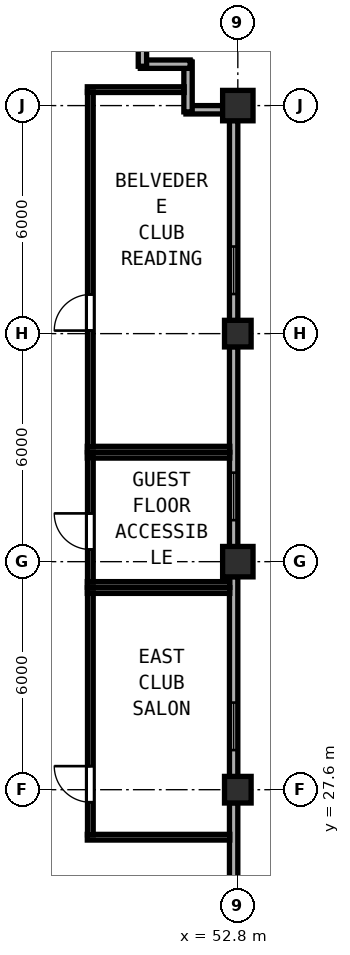
"""IFC4 building model, lengths in metres.
Left out: names, types, materials, properties, quantities, classifications, styles, units other than length and angle.
Written with IfcOpenShell. Run it as: python <this file> out.ifc"""

import sys

from ifc_helpers import new_model, si_unit, direction, frame, frame_2d, origin, origin_2d, place, context, subcontext, project, spatial, rectangle, hollow_rectangle, extrude, element, fill, save


model = new_model("IFC4")
c1 = context("Model", 3, precision=1e-05, world=origin(), true_north=direction((0.0, 1.0)))
c2 = subcontext(c1, "Body", "Model", "MODEL_VIEW")
j1 = project(units=[si_unit("LENGTHUNIT", "METRE"), si_unit("PLANEANGLEUNIT", "RADIAN")], contexts=[c1])
p1 = place(None, origin())
s1 = spatial("IfcSite", under=j1, at=p1, CompositionType="ELEMENT")
p2 = place(p1, origin())
s2 = spatial("IfcBuilding", under=s1, at=p2, CompositionType="ELEMENT")
p3 = place(p2, frame((0.0, 0.0, 269.85)))
s3 = spatial("IfcBuildingStorey", under=s2, at=p3, CompositionType="ELEMENT", Elevation=269.85)
for number, where, z_axis, x_axis in (
    (1, (52.8, 33.6, 0.0), (0.0, 0.0, 1.0), (1.0, 0.0, 0.0)),
    (2, (52.8, 45.6, 0.0), (0.0, 0.0, 1.0), (1.0, 0.0, 0.0)),
):
    element("IfcColumn", number, at=place(p3, frame(where, z_axis=z_axis, x_axis=x_axis)), inside=s3, PredefinedType="COLUMN", context=c2, shape_type="SweptSolid", body=[
        extrude(hollow_rectangle(XDim=0.8, YDim=0.8, WallThickness=0.03, at=origin_2d()), origin(), (0.0, 0.0, 1.0), 3.85),
    ])
for number, where, z_axis, x_axis in (
    (3, (52.8, 27.6, 0.0), (0.0, 0.0, 1.0), (1.0, 0.0, 0.0)),
    (4, (52.8, 39.6, 0.0), (0.0, 0.0, 1.0), (1.0, 0.0, 0.0)),
):
    element("IfcColumn", number, at=place(p3, frame(where, z_axis=z_axis, x_axis=x_axis)), inside=s3, PredefinedType="COLUMN", context=c2, shape_type="SweptSolid", body=[
        extrude(hollow_rectangle(XDim=0.7, YDim=0.7, WallThickness=0.026, at=origin_2d()), origin(), (0.0, 0.0, 1.0), 3.85),
    ])
p4 = place(p3, frame((52.69, 21.992, 0.0), z_axis=(0.0, 0.0, 1.0), x_axis=(0.0, 1.0, 0.0)))
e5 = element("IfcWall", 5, at=p4, inside=s3, PredefinedType="SOLIDWALL", context=c2, shape_type="SweptSolid", body=[
    extrude(rectangle(XDim=5.266, YDim=0.22, at=frame_2d((2.633, 0.0))), origin(), (0.0, 0.0, 1.0), 3.315),
])
p5 = place(p4, frame((0.7, 0.0, 0.85)))
e6 = element("IfcOpeningElement", 6, at=p5, cuts=e5, PredefinedType="OPENING", context=c2, shape_type="SweptSolid", body=[
    extrude(rectangle(XDim=1.25, YDim=1.95, at=frame_2d((0.625, 0.975))), frame((0.0, 0.12, 0.0), z_axis=(0.0, -1.0, 0.0), x_axis=(1.0, 0.0, 0.0)), (0.0, 0.0, 1.0), 0.24),
])
p6 = place(p3, frame((52.69, 27.942, 0.0), z_axis=(0.0, 0.0, 1.0), x_axis=(0.0, 1.0, 0.0)))
e7 = element("IfcWall", 7, at=p6, inside=s3, PredefinedType="SOLIDWALL", context=c2, shape_type="SweptSolid", body=[
    extrude(rectangle(XDim=5.266, YDim=0.22, at=frame_2d((2.633, 0.0))), origin(), (0.0, 0.0, 1.0), 3.315),
])
p7 = place(p6, frame((0.7, 0.0, 0.85)))
e8 = element("IfcOpeningElement", 8, at=p7, cuts=e7, PredefinedType="OPENING", context=c2, shape_type="SweptSolid", body=[
    extrude(rectangle(XDim=1.25, YDim=1.95, at=frame_2d((0.625, 0.975))), frame((0.0, 0.12, 0.0), z_axis=(0.0, -1.0, 0.0), x_axis=(1.0, 0.0, 0.0)), (0.0, 0.0, 1.0), 0.24),
])
p8 = place(p3, frame((52.69, 33.992, 0.0), z_axis=(0.0, 0.0, 1.0), x_axis=(0.0, 1.0, 0.0)))
e9 = element("IfcWall", 9, at=p8, inside=s3, PredefinedType="SOLIDWALL", context=c2, shape_type="SweptSolid", body=[
    extrude(rectangle(XDim=5.266, YDim=0.22, at=frame_2d((2.633, 0.0))), origin(), (0.0, 0.0, 1.0), 3.315),
])
p9 = place(p8, frame((0.7, 0.0, 0.85)))
e10 = element("IfcOpeningElement", 10, at=p9, cuts=e9, PredefinedType="OPENING", context=c2, shape_type="SweptSolid", body=[
    extrude(rectangle(XDim=1.25, YDim=1.95, at=frame_2d((0.625, 0.975))), frame((0.0, 0.12, 0.0), z_axis=(0.0, -1.0, 0.0), x_axis=(1.0, 0.0, 0.0)), (0.0, 0.0, 1.0), 0.24),
])
p10 = place(p3, frame((52.69, 39.942, 0.0), z_axis=(0.0, 0.0, 1.0), x_axis=(0.0, 1.0, 0.0)))
e11 = element("IfcWall", 11, at=p10, inside=s3, PredefinedType="SOLIDWALL", context=c2, shape_type="SweptSolid", body=[
    extrude(rectangle(XDim=5.266, YDim=0.22, at=frame_2d((2.633, 0.0))), origin(), (0.0, 0.0, 1.0), 3.315),
])
p11 = place(p10, frame((0.7, 0.0, 0.85)))
e12 = element("IfcOpeningElement", 12, at=p11, cuts=e11, PredefinedType="OPENING", context=c2, shape_type="SweptSolid", body=[
    extrude(rectangle(XDim=1.25, YDim=1.95, at=frame_2d((0.625, 0.975))), frame((0.0, 0.12, 0.0), z_axis=(0.0, -1.0, 0.0), x_axis=(1.0, 0.0, 0.0)), (0.0, 0.0, 1.0), 0.24),
])
p12 = place(p3, frame((52.408, 45.49, 0.0), z_axis=(0.0, 0.0, 1.0), x_axis=(-1.0, 0.0, 0.0)))
e13 = element("IfcWall", 13, at=p12, inside=s3, PredefinedType="SOLIDWALL", context=c2, shape_type="SweptSolid", body=[
    extrude(rectangle(XDim=0.973, YDim=0.22, at=frame_2d((0.486, 0.0))), origin(), (0.0, 0.0, 1.0), 3.67),
])
p13 = place(p3, frame((51.49, 45.435, 0.0), z_axis=(0.0, 0.0, 1.0), x_axis=(0.0, 1.0, 0.0)))
e14 = element("IfcWall", 14, at=p13, inside=s3, PredefinedType="SOLIDWALL", context=c2, shape_type="SweptSolid", body=[
    extrude(rectangle(XDim=1.31, YDim=0.22, at=frame_2d((0.655, 0.0))), origin(), (0.0, 0.0, 1.0), 3.67),
])
p14 = place(p3, frame((51.545, 46.69, 0.0), z_axis=(0.0, 0.0, 1.0), x_axis=(-1.0, 0.0, 0.0)))
e15 = element("IfcWall", 15, at=p14, inside=s3, PredefinedType="SOLIDWALL", context=c2, shape_type="SweptSolid", body=[
    extrude(rectangle(XDim=1.31, YDim=0.22, at=frame_2d((0.655, 0.0))), origin(), (0.0, 0.0, 1.0), 3.67),
])
p15 = place(p3, frame((50.29, 46.635, 0.0), z_axis=(0.0, 0.0, 1.0), x_axis=(0.0, 1.0, 0.0)))
e16 = element("IfcWall", 16, at=p15, inside=s3, PredefinedType="SOLIDWALL", context=c2, shape_type="SweptSolid", body=[
    extrude(rectangle(XDim=1.535, YDim=0.22, at=frame_2d((0.768, 0.0))), origin(), (0.0, 0.0, 1.0), 3.67),
])
for number, where, z_axis, x_axis in (
    (17, (48.84, 36.4, 0.0), (0.0, 0.0, 1.0), (1.0, 0.0, 0.0)),
    (18, (48.84, 33.0, 0.0), (0.0, 0.0, 1.0), (1.0, 0.0, 0.0)),
):
    element("IfcWall", number, at=place(p3, frame(where, z_axis=z_axis, x_axis=x_axis)), inside=s3, PredefinedType="PARTITIONING", context=c2, shape_type="SweptSolid", body=[
        extrude(rectangle(XDim=3.748, YDim=0.15, at=frame_2d((1.874, 0.0))), origin(), (0.0, 0.0, 1.0), 3.67),
    ])
p16 = place(p3, frame((48.92, 33.06, 0.0), z_axis=(0.0, 0.0, 1.0), x_axis=(0.0, 1.0, 0.0)))
e19 = element("IfcWall", 19, at=p16, inside=s3, PredefinedType="PARTITIONING", context=c2, shape_type="SweptSolid", body=[
    extrude(rectangle(XDim=3.28, YDim=0.15, at=frame_2d((1.64, 0.0))), origin(), (0.0, 0.0, 1.0), 3.67),
])
p17 = place(p16, frame((0.86, 0.0, 0.0)))
e20 = element("IfcOpeningElement", 20, at=p17, cuts=e19, PredefinedType="OPENING", context=c2, shape_type="SweptSolid", body=[
    extrude(rectangle(XDim=0.95, YDim=2.12, at=frame_2d((0.475, 1.06))), frame((0.0, 0.085, 0.0), z_axis=(0.0, -1.0, 0.0), x_axis=(1.0, 0.0, 0.0)), (0.0, 0.0, 1.0), 0.17),
])
p18 = place(p3, frame((48.84, 46.02, 0.0), z_axis=(0.0, 0.0, 1.0), x_axis=(1.0, 0.0, 0.0)))
e21 = element("IfcWall", 21, at=p18, inside=s3, PredefinedType="PARTITIONING", context=c2, shape_type="SweptSolid", body=[
    extrude(rectangle(XDim=2.548, YDim=0.15, at=frame_2d((1.274, 0.0))), origin(), (0.0, 0.0, 1.0), 3.67),
])
p19 = place(p3, frame((48.84, 36.56, 0.0), z_axis=(0.0, 0.0, 1.0), x_axis=(1.0, 0.0, 0.0)))
e22 = element("IfcWall", 22, at=p19, inside=s3, PredefinedType="PARTITIONING", context=c2, shape_type="SweptSolid", body=[
    extrude(rectangle(XDim=3.748, YDim=0.15, at=frame_2d((1.874, 0.0))), origin(), (0.0, 0.0, 1.0), 3.67),
])
p20 = place(p3, frame((48.92, 36.62, 0.0), z_axis=(0.0, 0.0, 1.0), x_axis=(0.0, 1.0, 0.0)))
e23 = element("IfcWall", 23, at=p20, inside=s3, PredefinedType="PARTITIONING", context=c2, shape_type="SweptSolid", body=[
    extrude(rectangle(XDim=9.34, YDim=0.15, at=frame_2d((4.67, 0.0))), origin(), (0.0, 0.0, 1.0), 3.67),
])
p21 = place(p20, frame((3.06, 0.0, 0.0)))
e24 = element("IfcOpeningElement", 24, at=p21, cuts=e23, PredefinedType="OPENING", context=c2, shape_type="SweptSolid", body=[
    extrude(rectangle(XDim=0.95, YDim=2.12, at=frame_2d((0.475, 1.06))), frame((0.0, 0.085, 0.0), z_axis=(0.0, -1.0, 0.0), x_axis=(1.0, 0.0, 0.0)), (0.0, 0.0, 1.0), 0.17),
])
for number, where, z_axis, x_axis in (
    (25, (48.84, 32.84, 0.0), (0.0, 0.0, 1.0), (1.0, 0.0, 0.0)),
    (26, (48.84, 26.35, 0.0), (0.0, 0.0, 1.0), (1.0, 0.0, 0.0)),
):
    element("IfcWall", number, at=place(p3, frame(where, z_axis=z_axis, x_axis=x_axis)), inside=s3, PredefinedType="PARTITIONING", context=c2, shape_type="SweptSolid", body=[
        extrude(rectangle(XDim=3.748, YDim=0.15, at=frame_2d((1.874, 0.0))), origin(), (0.0, 0.0, 1.0), 3.67),
    ])
p22 = place(p3, frame((48.92, 26.41, 0.0), z_axis=(0.0, 0.0, 1.0), x_axis=(0.0, 1.0, 0.0)))
e27 = element("IfcWall", 27, at=p22, inside=s3, PredefinedType="PARTITIONING", context=c2, shape_type="SweptSolid", body=[
    extrude(rectangle(XDim=6.37, YDim=0.15, at=frame_2d((3.185, 0.0))), origin(), (0.0, 0.0, 1.0), 3.67),
])
p23 = place(p22, frame((0.86, 0.0, 0.0)))
e28 = element("IfcOpeningElement", 28, at=p23, cuts=e27, PredefinedType="OPENING", context=c2, shape_type="SweptSolid", body=[
    extrude(rectangle(XDim=0.95, YDim=2.12, at=frame_2d((0.475, 1.06))), frame((0.0, 0.085, 0.0), z_axis=(0.0, -1.0, 0.0), x_axis=(1.0, 0.0, 0.0)), (0.0, 0.0, 1.0), 0.17),
])
p24 = place(p7, origin())
e29 = element("IfcWindow", 29, at=p24, inside=s3, PartitioningType="SINGLE_PANEL", PredefinedType="WINDOW", context=c2, shape_type="SweptSolid", body=[
    extrude(rectangle(XDim=1.25, YDim=1.95, at=frame_2d((0.625, 0.975))), frame((0.0, 0.03, 0.0), z_axis=(0.0, -1.0, 0.0), x_axis=(1.0, 0.0, 0.0)), (0.0, 0.0, 1.0), 0.06),
])
fill(e8, e29)
p25 = place(p9, origin())
e30 = element("IfcWindow", 30, at=p25, inside=s3, PartitioningType="SINGLE_PANEL", PredefinedType="WINDOW", context=c2, shape_type="SweptSolid", body=[
    extrude(rectangle(XDim=1.25, YDim=1.95, at=frame_2d((0.625, 0.975))), frame((0.0, 0.03, 0.0), z_axis=(0.0, -1.0, 0.0), x_axis=(1.0, 0.0, 0.0)), (0.0, 0.0, 1.0), 0.06),
])
fill(e10, e30)
p26 = place(p11, origin())
e31 = element("IfcWindow", 31, at=p26, inside=s3, PartitioningType="SINGLE_PANEL", PredefinedType="WINDOW", context=c2, shape_type="SweptSolid", body=[
    extrude(rectangle(XDim=1.25, YDim=1.95, at=frame_2d((0.625, 0.975))), frame((0.0, 0.03, 0.0), z_axis=(0.0, -1.0, 0.0), x_axis=(1.0, 0.0, 0.0)), (0.0, 0.0, 1.0), 0.06),
])
fill(e12, e31)
p27 = place(p17, origin())
e32 = element("IfcDoor", 32, at=p27, inside=s3, OperationType="SINGLE_SWING_RIGHT", PredefinedType="DOOR", context=c2, shape_type="SweptSolid", body=[
    extrude(rectangle(XDim=0.95, YDim=2.12, at=frame_2d((0.475, 1.06))), frame((0.0, 0.025, 0.0), z_axis=(0.0, -1.0, 0.0), x_axis=(1.0, 0.0, 0.0)), (0.0, 0.0, 1.0), 0.05),
])
fill(e20, e32)
p28 = place(p21, origin())
e33 = element("IfcDoor", 33, at=p28, inside=s3, OperationType="SINGLE_SWING_LEFT", PredefinedType="DOOR", context=c2, shape_type="SweptSolid", body=[
    extrude(rectangle(XDim=0.95, YDim=2.12, at=frame_2d((0.475, 1.06))), frame((0.0, 0.025, 0.0), z_axis=(0.0, -1.0, 0.0), x_axis=(1.0, 0.0, 0.0)), (0.0, 0.0, 1.0), 0.05),
])
fill(e24, e33)
p29 = place(p23, origin())
e34 = element("IfcDoor", 34, at=p29, inside=s3, OperationType="SINGLE_SWING_RIGHT", PredefinedType="DOOR", context=c2, shape_type="SweptSolid", body=[
    extrude(rectangle(XDim=0.95, YDim=2.12, at=frame_2d((0.475, 1.06))), frame((0.0, 0.025, 0.0), z_axis=(0.0, -1.0, 0.0), x_axis=(1.0, 0.0, 0.0)), (0.0, 0.0, 1.0), 0.05),
])
fill(e28, e34)
save(model, sys.argv[1])
